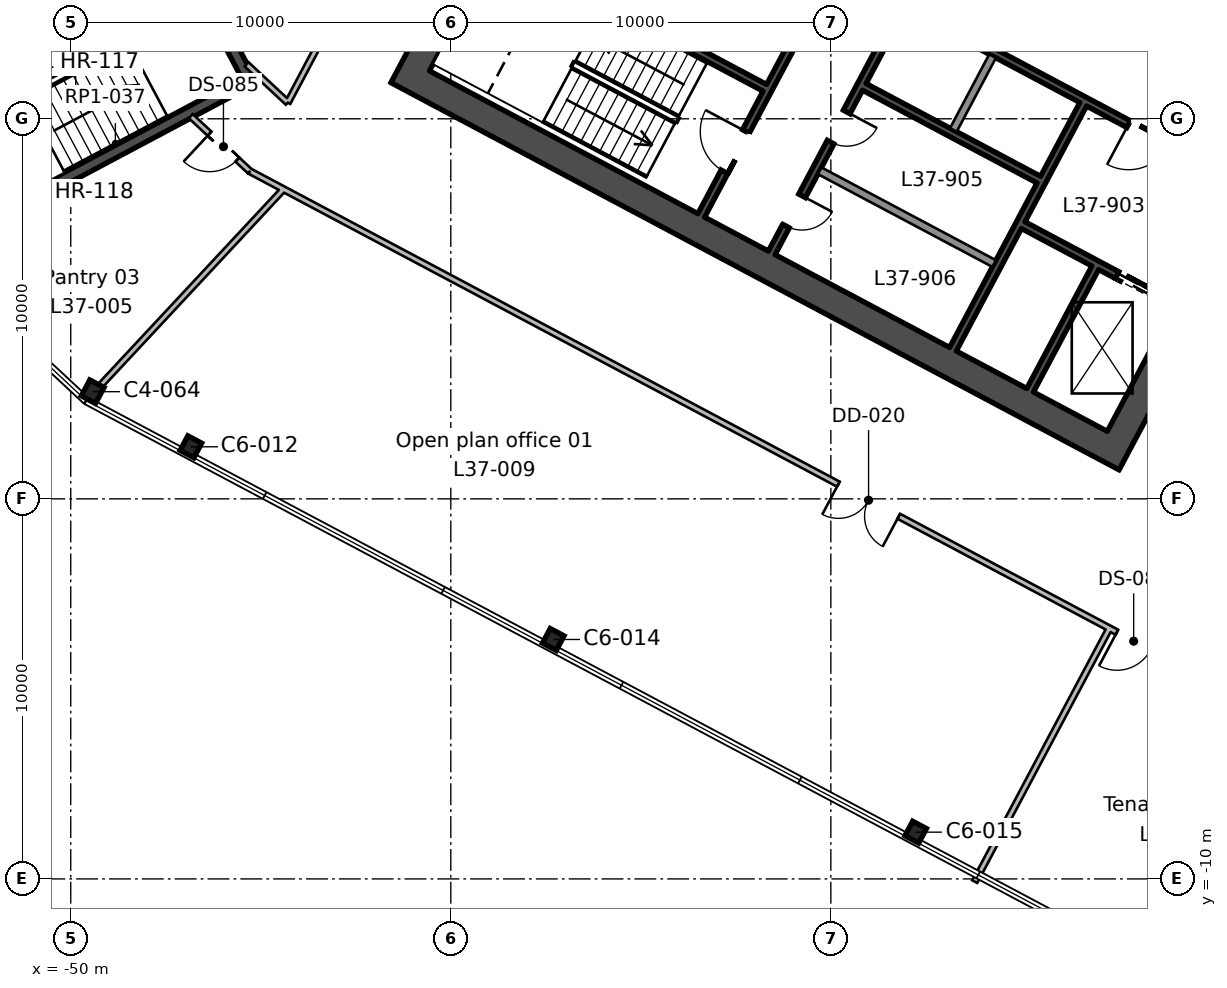
"""IFC4 building model, lengths in metres.
Left out: names, types, materials, properties, quantities, classifications, styles, units other than length and angle.
Written with IfcOpenShell. Run it as: python <this file> out.ifc"""

import sys

from ifc_helpers import new_model, si_unit, direction, frame, frame_2d, origin, origin_2d, place, context, subcontext, project, spatial, rectangle, i_section, extrude, element, fill, save


model = new_model("IFC4")
c1 = context("Model", 3, precision=1e-05, world=origin(), true_north=direction((0.0, 1.0)))
c2 = subcontext(c1, "Body", "Model", "MODEL_VIEW")
j1 = project(units=[si_unit("LENGTHUNIT", "METRE"), si_unit("PLANEANGLEUNIT", "RADIAN")], contexts=[c1])
p1 = place(None, origin())
s1 = spatial("IfcSite", under=j1, at=p1, CompositionType="ELEMENT")
p2 = place(p1, origin())
s2 = spatial("IfcBuilding", under=s1, at=p2, CompositionType="ELEMENT")
p3 = place(p2, frame((0.0, 0.0, 174.2)))
s3 = spatial("IfcBuildingStorey", under=s2, at=p3, CompositionType="ELEMENT", Elevation=174.2)
for number, where, z_axis, x_axis in (
    (1, (-27.768, -8.77, 0.0), (0.0, 0.0, 1.0), (0.883, -0.469, 0.0)),
    (2, (-37.304, -3.7, 0.0), (0.0, 0.0, 1.0), (0.883, -0.469, 0.0)),
    (3, (-46.839, 1.37, 0.0), (0.0, 0.0, 1.0), (0.883, -0.469, 0.0)),
):
    element("IfcColumn", number, at=place(p3, frame(where, z_axis=z_axis, x_axis=x_axis)), inside=s3, PredefinedType="COLUMN", context=c2, shape_type="SweptSolid", body=[
        extrude(i_section(OverallWidth=0.412, OverallDepth=0.434, WebThickness=0.036, FlangeThickness=0.057, FilletRadius=0.015, at=origin_2d()), origin(), (0.0, 0.0, 1.0), 4.0),
    ])
p4 = place(p3, frame((-49.423, 2.82, 0.0), z_axis=(0.0, 0.0, 1.0), x_axis=(0.882947592859, -0.469471562786, 0.0)))
e4 = element("IfcColumn", 4, at=p4, inside=s3, PredefinedType="COLUMN", context=c2, shape_type="SweptSolid", body=[
    extrude(i_section(OverallWidth=0.424, OverallDepth=0.475, WebThickness=0.048, FlangeThickness=0.077, FilletRadius=0.015, at=origin_2d()), origin(), (0.0, 0.0, 1.0), 4.0),
])
p5 = place(p3, frame((-13.498, 18.333, 0.0), z_axis=(0.0, 0.0, 1.0), x_axis=(-0.469469918705, -0.88294846703, 0.0)))
e5 = element("IfcWall", 5, at=p5, inside=s3, PredefinedType="SHEAR", context=c2, shape_type="SweptSolid", body=[
    extrude(rectangle(XDim=19.7, YDim=0.75, at=frame_2d((9.85, 0.0))), origin(), (0.0, 0.0, 1.0), 4.0),
])
p6 = place(p5, frame((6.85, 0.0, 0.0)))
e6 = element("IfcOpeningElement", 6, at=p6, cuts=e5, PredefinedType="OPENING", context=c2, shape_type="SweptSolid", body=[
    extrude(rectangle(XDim=2.4, YDim=2.4, at=frame_2d((1.2, 1.2))), frame((0.0, 0.385, 0.0), z_axis=(0.0, -1.0, 0.0), x_axis=(1.0, 0.0, 0.0)), (0.0, 0.0, 1.0), 0.77),
])
p7 = place(p3, frame((-31.996, 28.168, 0.0), z_axis=(0.0, 0.0, 1.0), x_axis=(-0.469479580143, -0.882943329908, 0.0)))
e7 = element("IfcWall", 7, at=p7, inside=s3, PredefinedType="SHEAR", context=c2, shape_type="SweptSolid", body=[
    extrude(rectangle(XDim=19.7, YDim=0.75, at=frame_2d((9.85, 0.0))), origin(), (0.0, 0.0, 1.0), 4.0),
])
p8 = place(p7, frame((10.45, 0.0, 0.0)))
e8 = element("IfcOpeningElement", 8, at=p8, cuts=e7, PredefinedType="OPENING", context=c2, shape_type="SweptSolid", body=[
    extrude(rectangle(XDim=2.4, YDim=2.4, at=frame_2d((1.2, 1.2))), frame((0.0, 0.385, 0.0), z_axis=(0.0, -1.0, 0.0), x_axis=(1.0, 0.0, 0.0)), (0.0, 0.0, 1.0), 0.77),
])
p9 = place(p3, frame((-22.902, 1.446, 0.0), z_axis=(0.0, 0.0, 1.0), x_axis=(-0.88294509198, 0.469476266226, 0.0)))
e9 = element("IfcWall", 9, at=p9, inside=s3, PredefinedType="SHEAR", context=c2, shape_type="SweptSolid", body=[
    extrude(rectangle(XDim=20.2, YDim=0.75, at=frame_2d((10.1, 0.0))), origin(), (0.0, 0.0, 1.0), 4.0),
])
p10 = place(p3, frame((-23.043, 6.08, 0.0), z_axis=(0.0, 0.0, 1.0), x_axis=(-0.469494272526, -0.882935517501, 0.0)))
e10 = element("IfcWall", 10, at=p10, inside=s3, PredefinedType="SHEAR", context=c2, shape_type="SweptSolid", body=[
    extrude(rectangle(XDim=3.65, YDim=0.2, at=frame_2d((1.825, 0.0))), origin(), (0.0, 0.0, 1.0), 4.0),
])
p11 = place(p3, frame((-23.36, 10.382, 0.0), z_axis=(0.0, 0.0, 1.0), x_axis=(-0.469480409012, -0.88294288918, 0.0)))
e11 = element("IfcWall", 11, at=p11, inside=s3, PredefinedType="SHEAR", context=c2, shape_type="SweptSolid", body=[
    extrude(rectangle(XDim=7.3, YDim=0.2, at=frame_2d((3.65, 0.0))), origin(), (0.0, 0.0, 1.0), 4.0),
])
p12 = place(p3, frame((-25.744, 11.65, 0.0), z_axis=(0.0, 0.0, 1.0), x_axis=(-0.469487830541, -0.882938942948, 0.0)))
e12 = element("IfcWall", 12, at=p12, inside=s3, PredefinedType="SOLIDWALL", context=c2, shape_type="SweptSolid", body=[
    extrude(rectangle(XDim=2.2, YDim=0.2, at=frame_2d((1.1, 0.0))), origin(), (0.0, 0.0, 1.0), 4.0),
])
p13 = place(p3, frame((-28.128, 12.917, 0.0), z_axis=(0.0, 0.0, 1.0), x_axis=(-0.469454336211, -0.882956752176, 0.0)))
e13 = element("IfcWall", 13, at=p13, inside=s3, PredefinedType="SHEAR", context=c2, shape_type="SweptSolid", body=[
    extrude(rectangle(XDim=7.3, YDim=0.2, at=frame_2d((3.65, 0.0))), origin(), (0.0, 0.0, 1.0), 4.0),
])
p14 = place(p13, frame((3.1, 0.0, 0.0)))
e14 = element("IfcOpeningElement", 14, at=p14, cuts=e13, PredefinedType="OPENING", context=c2, shape_type="SweptSolid", body=[
    extrude(rectangle(XDim=0.9, YDim=2.1, at=frame_2d((0.45, 1.05))), frame((0.0, 0.11, 0.0), z_axis=(0.0, -1.0, 0.0), x_axis=(1.0, 0.0, 0.0)), (0.0, 0.0, 1.0), 0.22),
])
p15 = place(p13, frame((5.6, 0.0, 0.0)))
e15 = element("IfcOpeningElement", 15, at=p15, cuts=e13, PredefinedType="OPENING", context=c2, shape_type="SweptSolid", body=[
    extrude(rectangle(XDim=0.9, YDim=2.1, at=frame_2d((0.45, 1.05))), frame((0.0, 0.11, 0.0), z_axis=(0.0, -1.0, 0.0), x_axis=(1.0, 0.0, 0.0)), (0.0, 0.0, 1.0), 0.22),
])
p16 = place(p3, frame((-29.982, 13.903, 0.0), z_axis=(0.0, 0.0, 1.0), x_axis=(-0.469454336211, -0.882956752176, 0.0)))
e16 = element("IfcWall", 16, at=p16, inside=s3, PredefinedType="SHEAR", context=c2, shape_type="SweptSolid", body=[
    extrude(rectangle(XDim=7.3, YDim=0.2, at=frame_2d((3.65, 0.0))), origin(), (0.0, 0.0, 1.0), 4.0),
])
p17 = place(p16, frame((4.8, 0.0, 0.0)))
e17 = element("IfcOpeningElement", 17, at=p17, cuts=e16, PredefinedType="OPENING", context=c2, shape_type="SweptSolid", body=[
    extrude(rectangle(XDim=1.2, YDim=2.1, at=frame_2d((0.6, 1.05))), frame((0.0, 0.11, 0.0), z_axis=(0.0, -1.0, 0.0), x_axis=(1.0, 0.0, 0.0)), (0.0, 0.0, 1.0), 0.22),
])
p18 = place(p3, frame((-19.252, 8.311, 0.0), z_axis=(0.0, 0.0, 1.0), x_axis=(-0.882955722218, 0.469456273365, 0.0)))
e18 = element("IfcWall", 18, at=p18, inside=s3, PredefinedType="SHEAR", context=c2, shape_type="SweptSolid", body=[
    extrude(rectangle(XDim=10.0, YDim=0.2, at=frame_2d((5.0, 0.0))), origin(), (0.0, 0.0, 1.0), 4.0),
])
p19 = place(p18, frame((2.1, 0.0, 0.0)))
e19 = element("IfcOpeningElement", 19, at=p19, cuts=e18, PredefinedType="OPENING", context=c2, shape_type="SweptSolid", body=[
    extrude(rectangle(XDim=1.2, YDim=2.1, at=frame_2d((0.6, 1.05))), frame((0.0, 0.11, 0.0), z_axis=(0.0, -1.0, 0.0), x_axis=(1.0, 0.0, 0.0)), (0.0, 0.0, 1.0), 0.22),
])
p20 = place(p3, frame((-24.528, 8.398, 0.0), z_axis=(0.0, 0.0, 1.0), x_axis=(-0.882953967957, 0.469459572775, 0.0)))
e20 = element("IfcWall", 20, at=p20, inside=s3, PredefinedType="SHEAR", context=c2, shape_type="SweptSolid", body=[
    extrude(rectangle(XDim=5.2, YDim=0.2, at=frame_2d((2.6, 0.0))), origin(), (0.0, 0.0, 1.0), 4.0),
])
p21 = place(p3, frame((-20.965, 5.088, 0.0), z_axis=(0.0, 0.0, 1.0), x_axis=(-0.882925986334, 0.469512196493, 0.0)))
e21 = element("IfcWall", 21, at=p21, inside=s3, PredefinedType="SHEAR", context=c2, shape_type="SweptSolid", body=[
    extrude(rectangle(XDim=4.5, YDim=0.2, at=frame_2d((2.25, 0.0))), origin(), (0.0, 0.0, 1.0), 4.0),
])
p22 = place(p21, frame((0.6, 0.0, 0.0)))
e22 = element("IfcOpeningElement", 22, at=p22, cuts=e21, PredefinedType="OPENING", context=c2, shape_type="SweptSolid", body=[
    extrude(rectangle(XDim=1.1, YDim=2.1, at=frame_2d((0.55, 1.05))), frame((0.0, 0.11, 0.0), z_axis=(0.0, -1.0, 0.0), x_axis=(1.0, 0.0, 0.0)), (0.0, 0.0, 1.0), 0.22),
])
p23 = place(p3, frame((-31.737, 10.816, 0.0), z_axis=(0.0, 0.0, 1.0), x_axis=(-0.882940221191, 0.469485426614, 0.0)))
e23 = element("IfcWall", 23, at=p23, inside=s3, PredefinedType="SHEAR", context=c2, shape_type="SweptSolid", body=[
    extrude(rectangle(XDim=8.0, YDim=0.2, at=frame_2d((4.0, 0.0))), origin(), (0.0, 0.0, 1.0), 4.0),
])
p24 = place(p3, frame((-25.702, 6.191, 0.0), z_axis=(0.0, 0.0, 1.0), x_axis=(-0.882934506056, 0.469496174655, 0.0)))
e24 = element("IfcWall", 24, at=p24, inside=s3, PredefinedType="SOLIDWALL", context=c2, shape_type="SweptSolid", body=[
    extrude(rectangle(XDim=5.2, YDim=0.2, at=frame_2d((2.6, 0.0))), origin(), (0.0, 0.0, 1.0), 4.0),
])
p25 = place(p3, frame((-47.574, 15.29, 0.0), z_axis=(0.0, 0.0, 1.0), x_axis=(0.469443498566, -0.882962514297, 0.0)))
e25 = element("IfcWall", 25, at=p25, inside=s3, PredefinedType="SHEAR", context=c2, shape_type="SweptSolid", body=[
    extrude(rectangle(XDim=4.85, YDim=0.3, at=frame_2d((2.425, 0.0))), origin(), (0.0, 0.0, 1.0), 4.0),
])
p26 = place(p3, frame((-45.297, 11.007, 0.0), z_axis=(0.0, 0.0, 1.0), x_axis=(-0.882951519127, -0.469464178475, 0.0)))
e26 = element("IfcWall", 26, at=p26, inside=s3, PredefinedType="SHEAR", context=c2, shape_type="SweptSolid", body=[
    extrude(rectangle(XDim=8.3, YDim=0.3, at=frame_2d((4.15, 0.0))), origin(), (0.0, 0.0, 1.0), 4.0),
])
p27 = place(p3, frame((-54.903, 11.393, 0.0), z_axis=(0.0, 0.0, 1.0), x_axis=(0.882939326045, 0.469487110071, 0.0)))
e27 = element("IfcWall", 27, at=p27, inside=s3, PredefinedType="SHEAR", context=c2, shape_type="SweptSolid", body=[
    extrude(rectangle(XDim=8.3, YDim=0.3, at=frame_2d((4.15, 0.0))), origin(), (0.0, 0.0, 1.0), 4.0),
])
p28 = place(p27, frame((6.05, 0.0, 0.0)))
e28 = element("IfcOpeningElement", 28, at=p28, cuts=e27, PredefinedType="OPENING", context=c2, shape_type="SweptSolid", body=[
    extrude(rectangle(XDim=1.9, YDim=2.1, at=frame_2d((0.95, 1.05))), frame((0.0, 0.16, 0.0), z_axis=(0.0, -1.0, 0.0), x_axis=(1.0, 0.0, 0.0)), (0.0, 0.0, 1.0), 0.32),
])
p29 = place(p3, frame((-44.402, 8.149, 0.0), z_axis=(0.0, 0.0, 1.0), x_axis=(-0.682039957921, -0.731314908777, 0.0)))
e29 = element("IfcWall", 29, at=p29, inside=s3, PredefinedType="PARTITIONING", context=c2, shape_type="SweptSolid", body=[
    extrude(rectangle(XDim=7.065, YDim=0.15, at=frame_2d((3.533, 0.0))), origin(), (0.0, 0.0, 1.0), 3.6),
])
p30 = place(p3, frame((-22.67, -3.406, 0.0), z_axis=(0.0, 0.0, 1.0), x_axis=(-0.469451537303, -0.882958240306, 0.0)))
e30 = element("IfcWall", 30, at=p30, inside=s3, PredefinedType="PARTITIONING", context=c2, shape_type="SweptSolid", body=[
    extrude(rectangle(XDim=7.55, YDim=0.15, at=frame_2d((3.775, 0.0))), origin(), (0.0, 0.0, 1.0), 3.6),
])
p31 = place(p3, frame((-33.409, 30.888, 0.0), z_axis=(0.0, 0.0, 1.0), x_axis=(-0.469498189487, -0.882933434676, 0.0)))
e31 = element("IfcWall", 31, at=p31, inside=s3, PredefinedType="PARTITIONING", context=c2, shape_type="SweptSolid", body=[
    extrude(rectangle(XDim=23.176, YDim=0.15, at=frame_2d((11.588, 0.0))), origin(), (0.0, 0.0, 1.0), 3.6),
])
p32 = place(p3, frame((-44.29, 10.425, 0.0), z_axis=(0.0, 0.0, 1.0), x_axis=(-0.731652828982, 0.681677444135, 0.0)))
e32 = element("IfcWall", 32, at=p32, inside=s3, PredefinedType="PARTITIONING", context=c2, shape_type="SweptSolid", body=[
    extrude(rectangle(XDim=1.48, YDim=0.15, at=frame_2d((0.74, 0.0))), origin(), (0.0, 0.0, 1.0), 3.6),
])
p33 = place(p3, frame((-44.462, 8.181, 0.0), z_axis=(0.0, 0.0, 1.0), x_axis=(-0.882750253305, 0.469842516478, 0.0)))
e33 = element("IfcWall", 33, at=p33, inside=s3, PredefinedType="PARTITIONING", context=c2, shape_type="SweptSolid", body=[
    extrude(rectangle(XDim=0.935, YDim=0.15, at=frame_2d((0.467, 0.0))), origin(), (0.0, 0.0, 1.0), 3.6),
])
p34 = place(p3, frame((-45.287, 8.62, 0.0), z_axis=(0.0, 0.0, 1.0), x_axis=(-0.731593637228, 0.681740969846, 0.0)))
e34 = element("IfcWall", 34, at=p34, inside=s3, PredefinedType="PARTITIONING", context=c2, shape_type="SweptSolid", body=[
    extrude(rectangle(XDim=2.125, YDim=0.15, at=frame_2d((1.063, 0.0))), origin(), (0.0, 0.0, 1.0), 3.6),
])
p35 = place(p34, frame((0.45, 0.0, 0.0)))
e35 = element("IfcOpeningElement", 35, at=p35, cuts=e34, PredefinedType="OPENING", context=c2, shape_type="SweptSolid", body=[
    extrude(rectangle(XDim=1.0, YDim=2.1, at=frame_2d((0.5, 1.05))), frame((0.0, 0.085, 0.0), z_axis=(0.0, -1.0, 0.0), x_axis=(1.0, 0.0, 0.0)), (0.0, 0.0, 1.0), 0.17),
])
p36 = place(p3, frame((-13.6, -8.228, 0.0), z_axis=(0.0, 0.0, 1.0), x_axis=(-0.882954510497, 0.469458552369, 0.0)))
e36 = element("IfcWall", 36, at=p36, inside=s3, PredefinedType="PARTITIONING", context=c2, shape_type="SweptSolid", body=[
    extrude(rectangle(XDim=34.953, YDim=0.15, at=frame_2d((17.477, 0.0))), origin(), (0.0, 0.0, 1.0), 3.6),
])
p37 = place(p36, frame((16.55, 0.0, 0.0)))
e37 = element("IfcOpeningElement", 37, at=p37, cuts=e36, PredefinedType="OPENING", context=c2, shape_type="SweptSolid", body=[
    extrude(rectangle(XDim=1.8, YDim=2.1, at=frame_2d((0.9, 1.05))), frame((0.0, 0.085, 0.0), z_axis=(0.0, -1.0, 0.0), x_axis=(1.0, 0.0, 0.0)), (0.0, 0.0, 1.0), 0.17),
])
p38 = place(p36, frame((9.05, 0.0, 0.0)))
e38 = element("IfcOpeningElement", 38, at=p38, cuts=e36, PredefinedType="OPENING", context=c2, shape_type="SweptSolid", body=[
    extrude(rectangle(XDim=1.0, YDim=2.1, at=frame_2d((0.5, 1.05))), frame((0.0, 0.085, 0.0), z_axis=(0.0, -1.0, 0.0), x_axis=(1.0, 0.0, 0.0)), (0.0, 0.0, 1.0), 0.17),
])
p39 = place(p19, origin())
e39 = element("IfcDoor", 39, at=p39, inside=s3, OperationType="SINGLE_SWING_RIGHT", PredefinedType="DOOR", context=c2, shape_type="SweptSolid", body=[
    extrude(rectangle(XDim=1.2, YDim=2.1, at=frame_2d((0.6, 1.05))), frame((0.0, 0.025, 0.0), z_axis=(0.0, -1.0, 0.0), x_axis=(1.0, 0.0, 0.0)), (0.0, 0.0, 1.0), 0.05),
])
fill(e19, e39)
p40 = place(p17, frame((1.2, 0.0, 0.0), z_axis=(0.0, 0.0, 1.0), x_axis=(-1.0, 0.0, 0.0)))
e40 = element("IfcDoor", 40, at=p40, inside=s3, OperationType="SINGLE_SWING_RIGHT", PredefinedType="DOOR", context=c2, shape_type="SweptSolid", body=[
    extrude(rectangle(XDim=1.2, YDim=2.1, at=frame_2d((0.6, 1.05))), frame((0.0, 0.025, 0.0), z_axis=(0.0, -1.0, 0.0), x_axis=(1.0, 0.0, 0.0)), (0.0, 0.0, 1.0), 0.05),
])
fill(e17, e40)
p41 = place(p22, origin())
e41 = element("IfcDoor", 41, at=p41, inside=s3, OperationType="DOUBLE_DOOR_SLIDING", PredefinedType="DOOR", context=c2, shape_type="SweptSolid", body=[
    extrude(rectangle(XDim=1.1, YDim=2.1, at=frame_2d((0.55, 1.05))), frame((0.0, 0.025, 0.0), z_axis=(0.0, -1.0, 0.0), x_axis=(1.0, 0.0, 0.0)), (0.0, 0.0, 1.0), 0.05),
])
fill(e22, e41)
p42 = place(p14, origin())
e42 = element("IfcDoor", 42, at=p42, inside=s3, OperationType="SINGLE_SWING_LEFT", PredefinedType="DOOR", context=c2, shape_type="SweptSolid", body=[
    extrude(rectangle(XDim=0.9, YDim=2.1, at=frame_2d((0.45, 1.05))), frame((0.0, 0.025, 0.0), z_axis=(0.0, -1.0, 0.0), x_axis=(1.0, 0.0, 0.0)), (0.0, 0.0, 1.0), 0.05),
])
fill(e14, e42)
p43 = place(p15, origin())
e43 = element("IfcDoor", 43, at=p43, inside=s3, OperationType="SINGLE_SWING_LEFT", PredefinedType="DOOR", context=c2, shape_type="SweptSolid", body=[
    extrude(rectangle(XDim=0.9, YDim=2.1, at=frame_2d((0.45, 1.05))), frame((0.0, 0.025, 0.0), z_axis=(0.0, -1.0, 0.0), x_axis=(1.0, 0.0, 0.0)), (0.0, 0.0, 1.0), 0.05),
])
fill(e15, e43)
p44 = place(p35, origin())
e44 = element("IfcDoor", 44, at=p44, inside=s3, OperationType="SINGLE_SWING_RIGHT", PredefinedType="DOOR", context=c2, shape_type="SweptSolid", body=[
    extrude(rectangle(XDim=1.0, YDim=2.1, at=frame_2d((0.5, 1.05))), frame((0.0, 0.025, 0.0), z_axis=(0.0, -1.0, 0.0), x_axis=(1.0, 0.0, 0.0)), (0.0, 0.0, 1.0), 0.05),
])
fill(e35, e44)
p45 = place(p37, origin())
e45 = element("IfcDoor", 45, at=p45, inside=s3, OperationType="DOUBLE_DOOR_SINGLE_SWING", PredefinedType="DOOR", context=c2, shape_type="SweptSolid", body=[
    extrude(rectangle(XDim=1.8, YDim=2.1, at=frame_2d((0.9, 1.05))), frame((0.0, 0.025, 0.0), z_axis=(0.0, -1.0, 0.0), x_axis=(1.0, 0.0, 0.0)), (0.0, 0.0, 1.0), 0.05),
])
fill(e37, e45)
p46 = place(p38, origin())
e46 = element("IfcDoor", 46, at=p46, inside=s3, OperationType="SINGLE_SWING_RIGHT", PredefinedType="DOOR", context=c2, shape_type="SweptSolid", body=[
    extrude(rectangle(XDim=1.0, YDim=2.1, at=frame_2d((0.5, 1.05))), frame((0.0, 0.025, 0.0), z_axis=(0.0, -1.0, 0.0), x_axis=(1.0, 0.0, 0.0)), (0.0, 0.0, 1.0), 0.05),
])
fill(e38, e46)
save(model, sys.argv[1])
